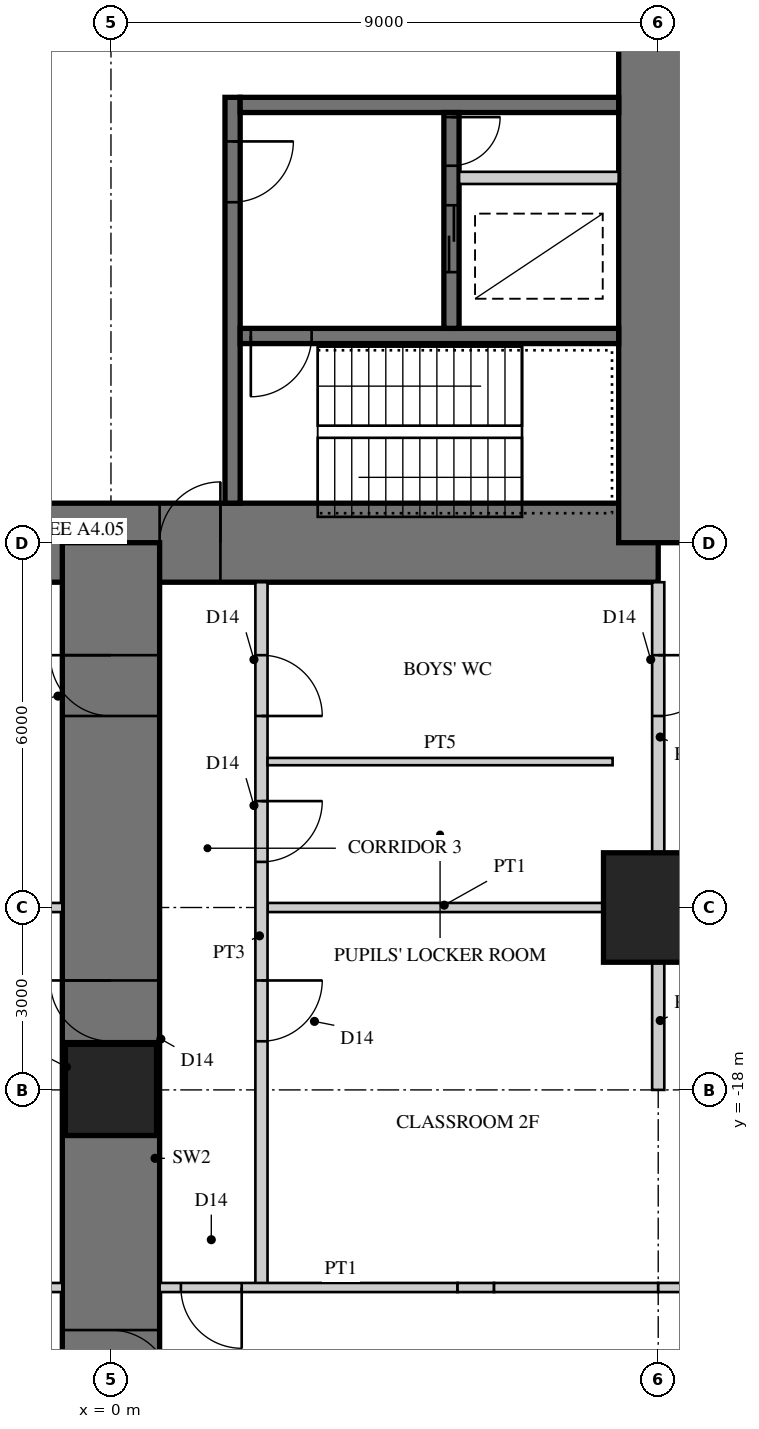
"""IFC4 building model, lengths in metres.
Left out: names, types, materials, properties, quantities, classifications, styles, units other than length and angle.
Written with IfcOpenShell. Run it as: python <this file> out.ifc"""

import sys

from ifc_helpers import new_model, si_unit, direction, frame, frame_2d, origin, origin_2d, place, context, subcontext, project, spatial, rectangle, extrude, element, fill, save


model = new_model("IFC4")
c1 = context("Model", 3, precision=1e-05, world=origin(), true_north=direction((0.0, 1.0)))
c2 = subcontext(c1, "Body", "Model", "MODEL_VIEW")
j1 = project(units=[si_unit("LENGTHUNIT", "METRE"), si_unit("PLANEANGLEUNIT", "RADIAN")], contexts=[c1])
p1 = place(None, origin())
s1 = spatial("IfcSite", under=j1, at=p1, CompositionType="ELEMENT")
p2 = place(p1, origin())
s2 = spatial("IfcBuilding", under=s1, at=p2, CompositionType="ELEMENT")
p3 = place(p2, frame((0.0, 0.0, 9.5)))
s3 = spatial("IfcBuildingStorey", under=s2, at=p3, CompositionType="ELEMENT", Elevation=9.5)
p4 = place(p3, frame((-9.0, -9.0, 0.0), z_axis=(0.0, 0.0, 1.0), x_axis=(1.0, 0.0, 0.0)))
e1 = element("IfcWall", 1, at=p4, inside=s3, PredefinedType="SHEAR", context=c2, shape_type="SweptSolid", body=[
    extrude(rectangle(XDim=18.0, YDim=1.3, at=frame_2d((9.0, 0.0))), origin(), (0.0, 0.0, 1.0), 4.5),
])
p5 = place(p4, frame((9.8, 0.0, 0.0)))
e2 = element("IfcOpeningElement", 2, at=p5, cuts=e1, PredefinedType="OPENING", context=c2, shape_type="SweptSolid", body=[
    extrude(rectangle(XDim=1.0, YDim=2.4, at=frame_2d((0.5, 1.2))), frame((0.0, 0.66, 0.0), z_axis=(0.0, -1.0, 0.0), x_axis=(1.0, 0.0, 0.0)), (0.0, 0.0, 1.0), 1.32),
])
p6 = place(p3, frame((9.0, -9.0, 0.0), z_axis=(0.0, 0.0, 1.0), x_axis=(0.0, 1.0, 0.0)))
e3 = element("IfcWall", 3, at=p6, inside=s3, PredefinedType="SHEAR", context=c2, shape_type="SweptSolid", body=[
    extrude(rectangle(XDim=18.0, YDim=1.3, at=frame_2d((9.0, 0.0))), origin(), (0.0, 0.0, 1.0), 4.5),
])
p7 = place(p6, frame((9.8, 0.0, 0.0)))
e4 = element("IfcOpeningElement", 4, at=p7, cuts=e3, PredefinedType="OPENING", context=c2, shape_type="SweptSolid", body=[
    extrude(rectangle(XDim=1.0, YDim=2.4, at=frame_2d((0.5, 1.2))), frame((0.0, 0.66, 0.0), z_axis=(0.0, -1.0, 0.0), x_axis=(1.0, 0.0, 0.0)), (0.0, 0.0, 1.0), 1.32),
])
p8 = place(p3, frame((2.0, -1.675, 0.0), z_axis=(0.0, 0.0, 1.0), x_axis=(0.0, -1.0, 0.0)))
e5 = element("IfcWall", 5, at=p8, inside=s3, PredefinedType="SHEAR", context=c2, shape_type="SweptSolid", body=[
    extrude(rectangle(XDim=6.675, YDim=0.25, at=frame_2d((3.337, 0.0))), origin(), (0.0, 0.0, 1.0), 4.5),
])
p9 = place(p8, frame((0.725, 0.0, 0.0)))
e6 = element("IfcOpeningElement", 6, at=p9, cuts=e5, PredefinedType="OPENING", context=c2, shape_type="SweptSolid", body=[
    extrude(rectangle(XDim=1.0, YDim=2.1, at=frame_2d((0.5, 1.05))), frame((0.0, 0.135, 0.0), z_axis=(0.0, -1.0, 0.0), x_axis=(1.0, 0.0, 0.0)), (0.0, 0.0, 1.0), 0.27),
])
p10 = place(p3, frame((2.125, -1.8, 0.0), z_axis=(0.0, 0.0, 1.0), x_axis=(1.0, 0.0, 0.0)))
e7 = element("IfcWall", 7, at=p10, inside=s3, PredefinedType="SHEAR", context=c2, shape_type="SweptSolid", body=[
    extrude(rectangle(XDim=6.225, YDim=0.25, at=frame_2d((3.113, 0.0))), origin(), (0.0, 0.0, 1.0), 4.5),
])
p11 = place(p3, frame((2.125, -5.6, 0.0), z_axis=(0.0, 0.0, 1.0), x_axis=(1.0, 0.0, 0.0)))
e8 = element("IfcWall", 8, at=p11, inside=s3, PredefinedType="SHEAR", context=c2, shape_type="SweptSolid", body=[
    extrude(rectangle(XDim=6.225, YDim=0.25, at=frame_2d((3.113, 0.0))), origin(), (0.0, 0.0, 1.0), 4.5),
])
p12 = place(p11, frame((0.175, 0.0, 0.0)))
e9 = element("IfcOpeningElement", 9, at=p12, cuts=e8, PredefinedType="OPENING", context=c2, shape_type="SweptSolid", body=[
    extrude(rectangle(XDim=1.0, YDim=2.1, at=frame_2d((0.5, 1.05))), frame((0.0, 0.135, 0.0), z_axis=(0.0, -1.0, 0.0), x_axis=(1.0, 0.0, 0.0)), (0.0, 0.0, 1.0), 0.27),
])
p13 = place(p3, frame((5.6, -1.925, 0.0), z_axis=(0.0, 0.0, 1.0), x_axis=(0.0, -1.0, 0.0)))
e10 = element("IfcWall", 10, at=p13, inside=s3, PredefinedType="SHEAR", context=c2, shape_type="SweptSolid", body=[
    extrude(rectangle(XDim=3.55, YDim=0.25, at=frame_2d((1.775, 0.0))), origin(), (0.0, 0.0, 1.0), 4.5),
])
p14 = place(p13, frame((1.525, 0.0, 0.0)))
e11 = element("IfcOpeningElement", 11, at=p14, cuts=e10, PredefinedType="OPENING", context=c2, shape_type="SweptSolid", body=[
    extrude(rectangle(XDim=1.1, YDim=2.2, at=frame_2d((0.55, 1.1))), frame((0.0, 0.135, 0.0), z_axis=(0.0, -1.0, 0.0), x_axis=(1.0, 0.0, 0.0)), (0.0, 0.0, 1.0), 0.27),
])
p15 = place(p13, frame((0.075, 0.0, 0.0)))
e12 = element("IfcOpeningElement", 12, at=p15, cuts=e10, PredefinedType="OPENING", context=c2, shape_type="SweptSolid", body=[
    extrude(rectangle(XDim=0.8, YDim=2.1, at=frame_2d((0.4, 1.05))), frame((0.0, 0.135, 0.0), z_axis=(0.0, -1.0, 0.0), x_axis=(1.0, 0.0, 0.0)), (0.0, 0.0, 1.0), 0.27),
])
p16 = place(p3, frame((5.725, -3.0, 0.0), z_axis=(0.0, 0.0, 1.0), x_axis=(1.0, 0.0, 0.0)))
e13 = element("IfcWall", 13, at=p16, inside=s3, PredefinedType="PARTITIONING", context=c2, shape_type="SweptSolid", body=[
    extrude(rectangle(XDim=2.625, YDim=0.2, at=frame_2d((1.312, 0.0))), origin(), (0.0, 0.0, 1.0), 4.5),
])
p17 = place(p3, frame((0.0, -9.0, 0.0), z_axis=(0.0, 0.0, 1.0), x_axis=(0.0, -1.0, 0.0)))
e14 = element("IfcWall", 14, at=p17, inside=s3, PredefinedType="SHEAR", context=c2, shape_type="SweptSolid", body=[
    extrude(rectangle(XDim=18.0, YDim=1.6, at=frame_2d((9.0, 0.0))), origin(), (0.0, 0.0, 1.0), 4.5),
])
p18 = place(p17, frame((1.85, 0.0, 0.0)))
e15 = element("IfcOpeningElement", 15, at=p18, cuts=e14, PredefinedType="OPENING", context=c2, shape_type="SweptSolid", body=[
    extrude(rectangle(XDim=1.0, YDim=2.2, at=frame_2d((0.5, 1.1))), frame((0.0, 0.81, 0.0), z_axis=(0.0, -1.0, 0.0), x_axis=(1.0, 0.0, 0.0)), (0.0, 0.0, 1.0), 1.62),
])
p19 = place(p17, frame((7.2, 0.0, 0.0)))
e16 = element("IfcOpeningElement", 16, at=p19, cuts=e14, PredefinedType="OPENING", context=c2, shape_type="SweptSolid", body=[
    extrude(rectangle(XDim=1.0, YDim=2.2, at=frame_2d((0.5, 1.1))), frame((0.0, 0.81, 0.0), z_axis=(0.0, -1.0, 0.0), x_axis=(1.0, 0.0, 0.0)), (0.0, 0.0, 1.0), 1.62),
])
p20 = place(p17, frame((12.95, 0.0, 0.0)))
e17 = element("IfcOpeningElement", 17, at=p20, cuts=e14, PredefinedType="OPENING", context=c2, shape_type="SweptSolid", body=[
    extrude(rectangle(XDim=1.0, YDim=2.2, at=frame_2d((0.5, 1.1))), frame((0.0, 0.81, 0.0), z_axis=(0.0, -1.0, 0.0), x_axis=(1.0, 0.0, 0.0)), (0.0, 0.0, 1.0), 1.62),
])
p21 = place(p3, frame((9.0, -15.0, 0.0), z_axis=(0.0, 0.0, 1.0), x_axis=(1.0, 0.0, 0.0)))
e18 = element("IfcColumn", 18, at=p21, inside=s3, PredefinedType="COLUMN", context=c2, shape_type="SweptSolid", body=[
    extrude(rectangle(XDim=1.8, YDim=1.8, at=origin_2d()), origin(), (0.0, 0.0, 1.0), 4.5),
])
p22 = place(p3, frame((0.0, -18.0, 0.0), z_axis=(0.0, 0.0, 1.0), x_axis=(1.0, 0.0, 0.0)))
e19 = element("IfcColumn", 19, at=p22, inside=s3, PredefinedType="COLUMN", context=c2, shape_type="SweptSolid", body=[
    extrude(rectangle(XDim=1.5, YDim=1.5, at=origin_2d()), origin(), (0.0, 0.0, 1.0), 4.5),
])
p23 = place(p3, frame((2.575, -15.0, 0.0), z_axis=(0.0, 0.0, 1.0), x_axis=(1.0, 0.0, 0.0)))
e20 = element("IfcWall", 20, at=p23, inside=s3, PredefinedType="PARTITIONING", context=c2, shape_type="SweptSolid", body=[
    extrude(rectangle(XDim=5.675, YDim=0.15, at=frame_2d((2.837, 0.0))), origin(), (0.0, 0.0, 1.0), 3.35),
])
p24 = place(p3, frame((-8.25, -15.0, 0.0), z_axis=(0.0, 0.0, 1.0), x_axis=(1.0, 0.0, 0.0)))
e21 = element("IfcWall", 21, at=p24, inside=s3, PredefinedType="PARTITIONING", context=c2, shape_type="SweptSolid", body=[
    extrude(rectangle(XDim=7.45, YDim=0.15, at=frame_2d((3.725, 0.0))), origin(), (0.0, 0.0, 1.0), 3.35),
])
p25 = place(p3, frame((2.475, -9.65, 0.0), z_axis=(0.0, 0.0, 1.0), x_axis=(0.0, -1.0, 0.0)))
e22 = element("IfcWall", 22, at=p25, inside=s3, PredefinedType="SOLIDWALL", context=c2, shape_type="SweptSolid", body=[
    extrude(rectangle(XDim=11.6, YDim=0.2, at=frame_2d((5.8, 0.0))), origin(), (0.0, 0.0, 1.0), 4.3),
])
p26 = place(p25, frame((1.2, 0.0, 0.0)))
e23 = element("IfcOpeningElement", 23, at=p26, cuts=e22, PredefinedType="OPENING", context=c2, shape_type="SweptSolid", body=[
    extrude(rectangle(XDim=1.0, YDim=2.2, at=frame_2d((0.5, 1.1))), frame((0.0, 0.11, 0.0), z_axis=(0.0, -1.0, 0.0), x_axis=(1.0, 0.0, 0.0)), (0.0, 0.0, 1.0), 0.22),
])
p27 = place(p25, frame((3.6, 0.0, 0.0)))
e24 = element("IfcOpeningElement", 24, at=p27, cuts=e22, PredefinedType="OPENING", context=c2, shape_type="SweptSolid", body=[
    extrude(rectangle(XDim=1.0, YDim=2.2, at=frame_2d((0.5, 1.1))), frame((0.0, 0.11, 0.0), z_axis=(0.0, -1.0, 0.0), x_axis=(1.0, 0.0, 0.0)), (0.0, 0.0, 1.0), 0.22),
])
p28 = place(p25, frame((6.55, 0.0, 0.0)))
e25 = element("IfcOpeningElement", 25, at=p28, cuts=e22, PredefinedType="OPENING", context=c2, shape_type="SweptSolid", body=[
    extrude(rectangle(XDim=1.0, YDim=2.2, at=frame_2d((0.5, 1.1))), frame((0.0, 0.11, 0.0), z_axis=(0.0, -1.0, 0.0), x_axis=(1.0, 0.0, 0.0)), (0.0, 0.0, 1.0), 0.22),
])
p29 = place(p3, frame((-5.7, -21.25, 0.0), z_axis=(0.0, 0.0, 1.0), x_axis=(1.0, 0.0, 0.0)))
e26 = element("IfcWall", 26, at=p29, inside=s3, PredefinedType="PARTITIONING", context=c2, shape_type="SweptSolid", body=[
    extrude(rectangle(XDim=4.9, YDim=0.15, at=frame_2d((2.45, 0.0))), origin(), (0.0, 0.0, 1.0), 3.35),
])
p30 = place(p3, frame((0.8, -21.25, 0.0), z_axis=(0.0, 0.0, 1.0), x_axis=(1.0, 0.0, 0.0)))
e27 = element("IfcWall", 27, at=p30, inside=s3, PredefinedType="PARTITIONING", context=c2, shape_type="SweptSolid", body=[
    extrude(rectangle(XDim=4.9, YDim=0.15, at=frame_2d((2.45, 0.0))), origin(), (0.0, 0.0, 1.0), 3.35),
])
p31 = place(p30, frame((0.35, 0.0, 0.0)))
e28 = element("IfcOpeningElement", 28, at=p31, cuts=e27, PredefinedType="OPENING", context=c2, shape_type="SweptSolid", body=[
    extrude(rectangle(XDim=1.0, YDim=2.2, at=frame_2d((0.5, 1.1))), frame((0.0, 0.085, 0.0), z_axis=(0.0, -1.0, 0.0), x_axis=(1.0, 0.0, 0.0)), (0.0, 0.0, 1.0), 0.17),
])
p32 = place(p3, frame((5.7, -21.25, 0.0), z_axis=(0.0, 0.0, 1.0), x_axis=(1.0, 0.0, 0.0)))
e29 = element("IfcWall", 29, at=p32, inside=s3, PredefinedType="PARTITIONING", context=c2, shape_type="SweptSolid", body=[
    extrude(rectangle(XDim=0.6, YDim=0.15, at=frame_2d((0.3, 0.0))), origin(), (0.0, 0.0, 1.0), 4.3),
])
p33 = place(p3, frame((6.3, -21.25, 0.0), z_axis=(0.0, 0.0, 1.0), x_axis=(1.0, 0.0, 0.0)))
e30 = element("IfcWall", 30, at=p33, inside=s3, PredefinedType="PARTITIONING", context=c2, shape_type="SweptSolid", body=[
    extrude(rectangle(XDim=2.7, YDim=0.15, at=frame_2d((1.35, 0.0))), origin(), (0.0, 0.0, 1.0), 3.35),
])
p34 = place(p3, frame((9.0, -21.25, 0.0), z_axis=(0.0, 0.0, 1.0), x_axis=(1.0, 0.0, 0.0)))
e31 = element("IfcWall", 31, at=p34, inside=s3, PredefinedType="PARTITIONING", context=c2, shape_type="SweptSolid", body=[
    extrude(rectangle(XDim=0.72, YDim=0.15, at=frame_2d((0.36, 0.0))), origin(), (0.0, 0.0, 1.0), 4.3),
])
p35 = place(p3, frame((2.575, -12.6, 0.0), z_axis=(0.0, 0.0, 1.0), x_axis=(1.0, 0.0, 0.0)))
e32 = element("IfcWall", 32, at=p35, inside=s3, PredefinedType="PLUMBINGWALL", context=c2, shape_type="SweptSolid", body=[
    extrude(rectangle(XDim=5.675, YDim=0.12, at=frame_2d((2.837, 0.0))), origin(), (0.0, 0.0, 1.0), 4.3),
])
p36 = place(p3, frame((9.0, -9.65, 0.0), z_axis=(0.0, 0.0, 1.0), x_axis=(0.0, -1.0, 0.0)))
e33 = element("IfcWall", 33, at=p36, inside=s3, PredefinedType="SOLIDWALL", context=c2, shape_type="SweptSolid", body=[
    extrude(rectangle(XDim=4.6, YDim=0.2, at=frame_2d((2.3, 0.0))), origin(), (0.0, 0.0, 1.0), 3.3),
])
p37 = place(p36, frame((1.2, 0.0, 0.0)))
e34 = element("IfcOpeningElement", 34, at=p37, cuts=e33, PredefinedType="OPENING", context=c2, shape_type="SweptSolid", body=[
    extrude(rectangle(XDim=1.0, YDim=2.2, at=frame_2d((0.5, 1.1))), frame((0.0, 0.11, 0.0), z_axis=(0.0, -1.0, 0.0), x_axis=(1.0, 0.0, 0.0)), (0.0, 0.0, 1.0), 0.22),
])
p38 = place(p3, frame((9.0, -15.75, 0.0), z_axis=(0.0, 0.0, 1.0), x_axis=(0.0, -1.0, 0.0)))
e35 = element("IfcWall", 35, at=p38, inside=s3, PredefinedType="SOLIDWALL", context=c2, shape_type="SweptSolid", body=[
    extrude(rectangle(XDim=2.25, YDim=0.2, at=frame_2d((1.125, 0.0))), origin(), (0.0, 0.0, 1.0), 3.3),
])
p39 = place(p26, origin())
e36 = element("IfcDoor", 36, at=p39, inside=s3, OperationType="SINGLE_SWING_RIGHT", PredefinedType="DOOR", context=c2, shape_type="SweptSolid", body=[
    extrude(rectangle(XDim=1.0, YDim=2.2, at=frame_2d((0.5, 1.1))), frame((0.0, 0.025, 0.0), z_axis=(0.0, -1.0, 0.0), x_axis=(1.0, 0.0, 0.0)), (0.0, 0.0, 1.0), 0.05),
])
fill(e23, e36)
p40 = place(p27, origin())
e37 = element("IfcDoor", 37, at=p40, inside=s3, OperationType="SINGLE_SWING_LEFT", PredefinedType="DOOR", context=c2, shape_type="SweptSolid", body=[
    extrude(rectangle(XDim=1.0, YDim=2.2, at=frame_2d((0.5, 1.1))), frame((0.0, 0.025, 0.0), z_axis=(0.0, -1.0, 0.0), x_axis=(1.0, 0.0, 0.0)), (0.0, 0.0, 1.0), 0.05),
])
fill(e24, e37)
p41 = place(p28, origin())
e38 = element("IfcDoor", 38, at=p41, inside=s3, OperationType="SINGLE_SWING_LEFT", PredefinedType="DOOR", context=c2, shape_type="SweptSolid", body=[
    extrude(rectangle(XDim=1.0, YDim=2.2, at=frame_2d((0.5, 1.1))), frame((0.0, 0.025, 0.0), z_axis=(0.0, -1.0, 0.0), x_axis=(1.0, 0.0, 0.0)), (0.0, 0.0, 1.0), 0.05),
])
fill(e25, e38)
p42 = place(p31, frame((1.0, 0.0, 0.0), z_axis=(0.0, 0.0, 1.0), x_axis=(-1.0, 0.0, 0.0)))
e39 = element("IfcDoor", 39, at=p42, inside=s3, OperationType="SINGLE_SWING_LEFT", PredefinedType="DOOR", context=c2, shape_type="SweptSolid", body=[
    extrude(rectangle(XDim=1.0, YDim=2.2, at=frame_2d((0.5, 1.1))), frame((0.0, 0.025, 0.0), z_axis=(0.0, -1.0, 0.0), x_axis=(1.0, 0.0, 0.0)), (0.0, 0.0, 1.0), 0.05),
])
fill(e28, e39)
p43 = place(p37, origin())
e40 = element("IfcDoor", 40, at=p43, inside=s3, OperationType="SINGLE_SWING_LEFT", PredefinedType="DOOR", context=c2, shape_type="SweptSolid", body=[
    extrude(rectangle(XDim=1.0, YDim=2.2, at=frame_2d((0.5, 1.1))), frame((0.0, 0.025, 0.0), z_axis=(0.0, -1.0, 0.0), x_axis=(1.0, 0.0, 0.0)), (0.0, 0.0, 1.0), 0.05),
])
fill(e34, e40)
p44 = place(p18, frame((1.0, 0.0, 0.0), z_axis=(0.0, 0.0, 1.0), x_axis=(-1.0, 0.0, 0.0)))
e41 = element("IfcDoor", 41, at=p44, inside=s3, OperationType="SINGLE_SWING_RIGHT", PredefinedType="DOOR", context=c2, shape_type="SweptSolid", body=[
    extrude(rectangle(XDim=1.0, YDim=2.2, at=frame_2d((0.5, 1.1))), frame((0.0, 0.025, 0.0), z_axis=(0.0, -1.0, 0.0), x_axis=(1.0, 0.0, 0.0)), (0.0, 0.0, 1.0), 0.05),
])
fill(e15, e41)
p45 = place(p19, frame((1.0, 0.0, 0.0), z_axis=(0.0, 0.0, 1.0), x_axis=(-1.0, 0.0, 0.0)))
e42 = element("IfcDoor", 42, at=p45, inside=s3, OperationType="SINGLE_SWING_RIGHT", PredefinedType="DOOR", context=c2, shape_type="SweptSolid", body=[
    extrude(rectangle(XDim=1.0, YDim=2.2, at=frame_2d((0.5, 1.1))), frame((0.0, 0.025, 0.0), z_axis=(0.0, -1.0, 0.0), x_axis=(1.0, 0.0, 0.0)), (0.0, 0.0, 1.0), 0.05),
])
fill(e16, e42)
p46 = place(p20, origin())
e43 = element("IfcDoor", 43, at=p46, inside=s3, OperationType="SINGLE_SWING_RIGHT", PredefinedType="DOOR", context=c2, shape_type="SweptSolid", body=[
    extrude(rectangle(XDim=1.0, YDim=2.2, at=frame_2d((0.5, 1.1))), frame((0.0, 0.025, 0.0), z_axis=(0.0, -1.0, 0.0), x_axis=(1.0, 0.0, 0.0)), (0.0, 0.0, 1.0), 0.05),
])
fill(e17, e43)
p47 = place(p5, origin())
e44 = element("IfcDoor", 44, at=p47, inside=s3, OperationType="SINGLE_SWING_RIGHT", PredefinedType="DOOR", context=c2, shape_type="SweptSolid", body=[
    extrude(rectangle(XDim=1.0, YDim=2.4, at=frame_2d((0.5, 1.2))), frame((0.0, 0.055, 0.0), z_axis=(0.0, -1.0, 0.0), x_axis=(1.0, 0.0, 0.0)), (0.0, 0.0, 1.0), 0.05),
])
fill(e2, e44)
p48 = place(p9, origin())
e45 = element("IfcDoor", 45, at=p48, inside=s3, OperationType="SINGLE_SWING_LEFT", PredefinedType="DOOR", context=c2, shape_type="SweptSolid", body=[
    extrude(rectangle(XDim=1.0, YDim=2.1, at=frame_2d((0.5, 1.05))), frame((0.0, 0.025, 0.0), z_axis=(0.0, -1.0, 0.0), x_axis=(1.0, 0.0, 0.0)), (0.0, 0.0, 1.0), 0.05),
])
fill(e6, e45)
p49 = place(p12, frame((1.0, 0.0, 0.0), z_axis=(0.0, 0.0, 1.0), x_axis=(-1.0, 0.0, 0.0)))
e46 = element("IfcDoor", 46, at=p49, inside=s3, OperationType="SINGLE_SWING_RIGHT", PredefinedType="DOOR", context=c2, shape_type="SweptSolid", body=[
    extrude(rectangle(XDim=1.0, YDim=2.1, at=frame_2d((0.5, 1.05))), frame((0.0, 0.025, 0.0), z_axis=(0.0, -1.0, 0.0), x_axis=(1.0, 0.0, 0.0)), (0.0, 0.0, 1.0), 0.05),
])
fill(e9, e46)
p50 = place(p14, origin())
e47 = element("IfcDoor", 47, at=p50, inside=s3, OperationType="DOUBLE_DOOR_SLIDING", PredefinedType="DOOR", context=c2, shape_type="SweptSolid", body=[
    extrude(rectangle(XDim=1.1, YDim=2.2, at=frame_2d((0.55, 1.1))), frame((0.0, 0.025, 0.0), z_axis=(0.0, -1.0, 0.0), x_axis=(1.0, 0.0, 0.0)), (0.0, 0.0, 1.0), 0.05),
])
fill(e11, e47)
p51 = place(p15, origin())
e48 = element("IfcDoor", 48, at=p51, inside=s3, OperationType="SINGLE_SWING_LEFT", PredefinedType="DOOR", context=c2, shape_type="SweptSolid", body=[
    extrude(rectangle(XDim=0.8, YDim=2.1, at=frame_2d((0.4, 1.05))), frame((0.0, 0.025, 0.0), z_axis=(0.0, -1.0, 0.0), x_axis=(1.0, 0.0, 0.0)), (0.0, 0.0, 1.0), 0.05),
])
fill(e12, e48)
save(model, sys.argv[1])
